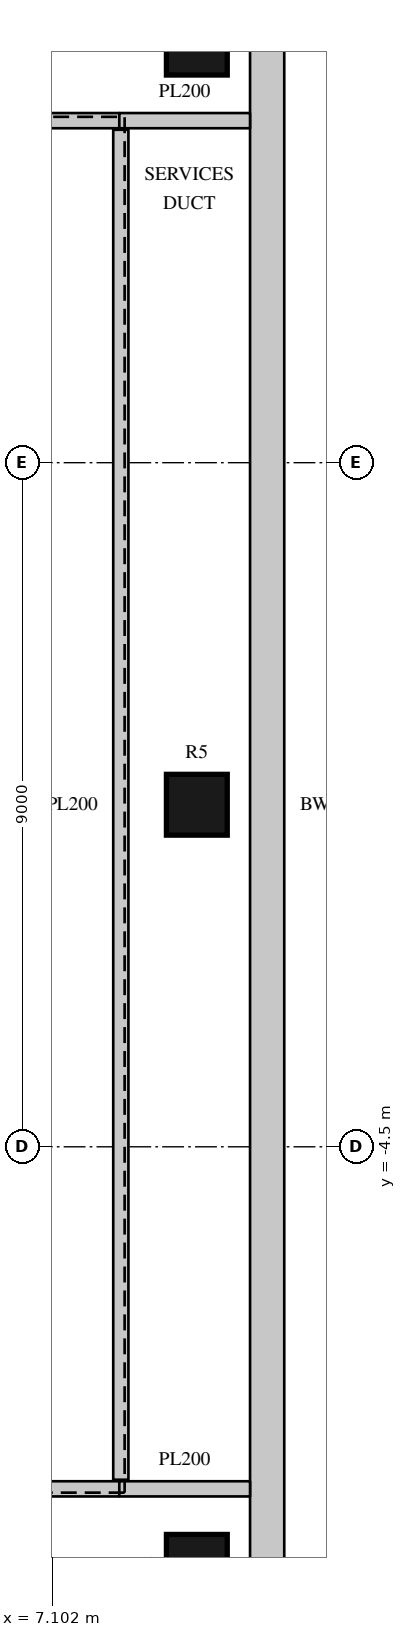
"""IFC4 building model, lengths in metres.
Left out: names, types, materials, properties, quantities, classifications, styles, units other than length and angle.
Written with IfcOpenShell. Run it as: python <this file> out.ifc"""

import sys

from ifc_helpers import new_model, si_unit, direction, frame, frame_2d, origin, origin_2d, place, context, subcontext, project, spatial, rectangle, circle, extrude, element, save


model = new_model("IFC4")
c1 = context("Model", 3, precision=1e-05, world=origin(), true_north=direction((0.0, 1.0)))
c2 = subcontext(c1, "Body", "Model", "MODEL_VIEW")
j1 = project(units=[si_unit("LENGTHUNIT", "METRE"), si_unit("PLANEANGLEUNIT", "RADIAN")], contexts=[c1])
p1 = place(None, origin())
s1 = spatial("IfcSite", under=j1, at=p1, CompositionType="ELEMENT")
p2 = place(p1, origin())
s2 = spatial("IfcBuilding", under=s1, at=p2, CompositionType="ELEMENT")
p3 = place(p2, frame((0.0, 0.0, 335.0)))
s3 = spatial("IfcBuildingStorey", under=s2, at=p3, CompositionType="ELEMENT", Elevation=335.0)
for number, where, z_axis, x_axis in (
    (1, (9.0, -10.0, 0.0), (0.0, 0.0, 1.0), (1.0, 0.0, 0.0)),
    (2, (9.0, 0.0, 0.0), (0.0, 0.0, 1.0), (1.0, 0.0, 0.0)),
    (3, (9.0, 10.0, 0.0), (0.0, 0.0, 1.0), (1.0, 0.0, 0.0)),
):
    element("IfcColumn", number, at=place(p3, frame(where, z_axis=z_axis, x_axis=x_axis)), inside=s3, PredefinedType="COLUMN", context=c2, shape_type="SweptSolid", body=[
        extrude(circle(Radius=0.4, at=origin_2d()), origin(), (0.0, 0.0, 1.0), 4.0),
    ])
p4 = place(p3, frame((9.925, -11.25, 0.0), z_axis=(0.0, 0.0, 1.0), x_axis=(0.0, 1.0, 0.0)))
e4 = element("IfcWall", 4, at=p4, inside=s3, PredefinedType="SOLIDWALL", context=c2, shape_type="SweptSolid", body=[
    extrude(rectangle(XDim=22.489, YDim=0.45, at=frame_2d((11.245, 0.0))), origin(), (0.0, 0.0, 1.0), 3.7),
])
for number, where, z_axis, x_axis in (
    (5, (-5.98, -9.0, 0.0), (0.0, 0.0, 1.0), (1.0, 0.0, 0.0)),
    (6, (-5.98, 9.0, 0.0), (0.0, 0.0, 1.0), (1.0, 0.0, 0.0)),
):
    element("IfcWall", number, at=place(p3, frame(where, z_axis=z_axis, x_axis=x_axis)), inside=s3, PredefinedType="PARTITIONING", context=c2, shape_type="SweptSolid", body=[
        extrude(rectangle(XDim=13.96, YDim=0.2, at=frame_2d((6.98, 0.0))), origin(), (0.0, 0.0, 1.0), 3.598),
    ])
for number, where, z_axis, x_axis in (
    (7, (7.98, -9.0, 0.0), (0.0, 0.0, 1.0), (1.0, 0.0, 0.0)),
    (8, (7.98, 9.0, 0.0), (0.0, 0.0, 1.0), (1.0, 0.0, 0.0)),
):
    element("IfcWall", number, at=place(p3, frame(where, z_axis=z_axis, x_axis=x_axis)), inside=s3, PredefinedType="PARTITIONING", context=c2, shape_type="SweptSolid", body=[
        extrude(rectangle(XDim=1.72, YDim=0.2, at=frame_2d((0.86, 0.0))), origin(), (0.0, 0.0, 1.0), 3.598),
    ])
p5 = place(p3, frame((8.0, -8.88, 0.0), z_axis=(0.0, 0.0, 1.0), x_axis=(0.0, 1.0, 0.0)))
e9 = element("IfcWall", 9, at=p5, inside=s3, PredefinedType="PARTITIONING", context=c2, shape_type="SweptSolid", body=[
    extrude(rectangle(XDim=17.76, YDim=0.2, at=frame_2d((8.88, 0.0))), origin(), (0.0, 0.0, 1.0), 3.598),
])
save(model, sys.argv[1])
